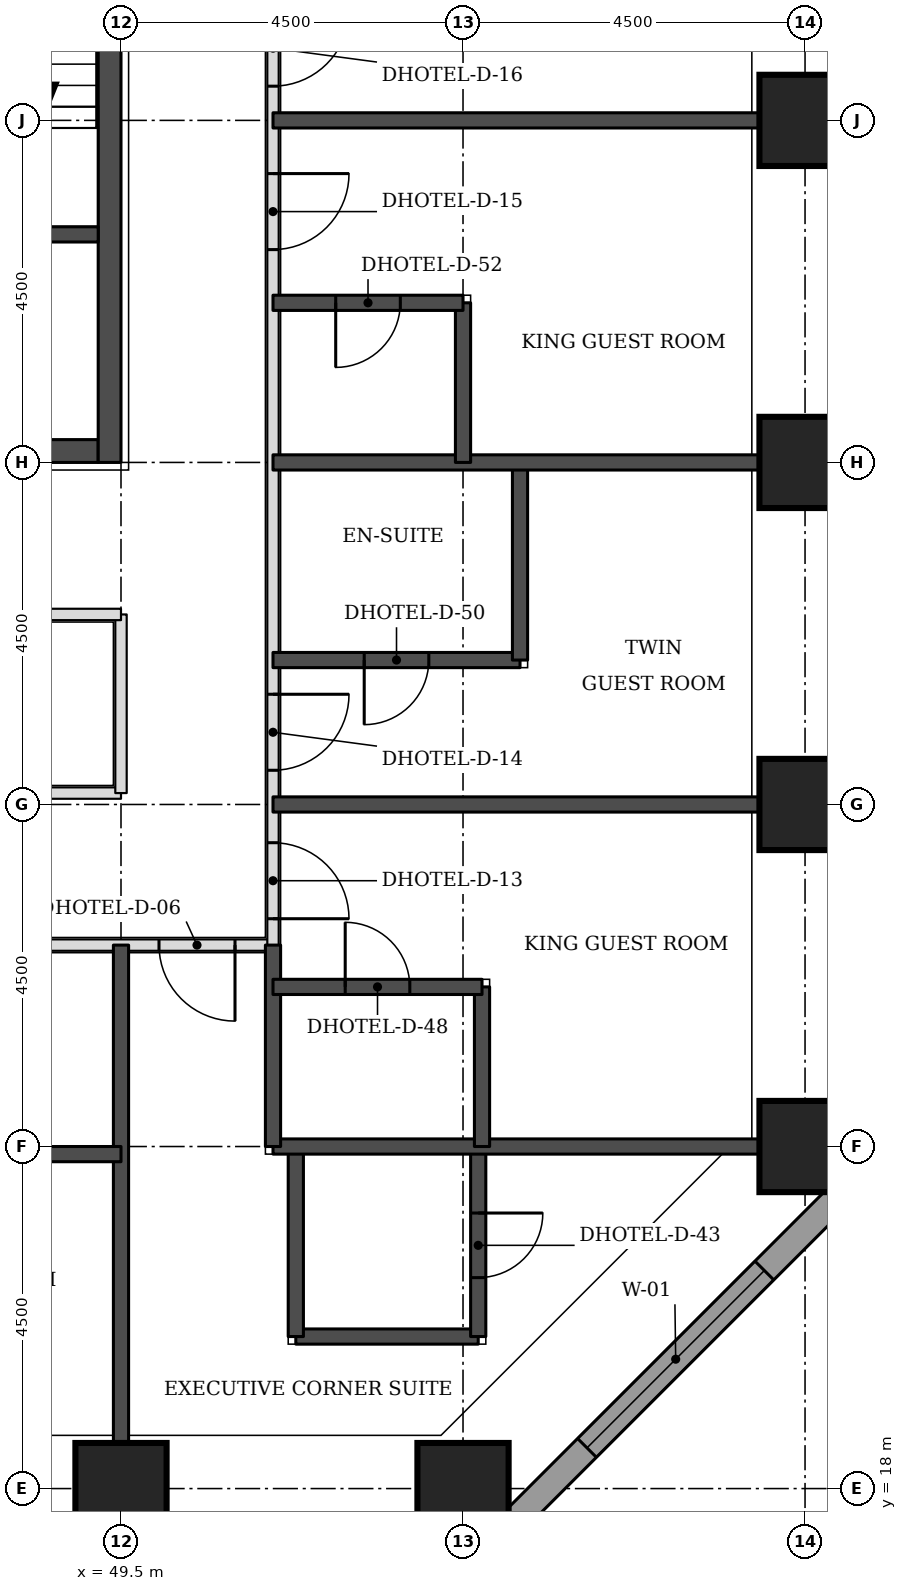
"""IFC4 building model, lengths in metres.
Left out: names, types, materials, properties, quantities, classifications, styles, units other than length and angle.
Written with IfcOpenShell. Run it as: python <this file> out.ifc"""

import sys

from ifc_helpers import new_model, si_unit, direction, frame, frame_2d, origin, origin_2d, place, context, subcontext, project, spatial, rectangle, extrude, element, fill, save


model = new_model("IFC4")
c1 = context("Model", 3, precision=1e-05, world=origin(), true_north=direction((0.0, 1.0)))
c2 = subcontext(c1, "Body", "Model", "MODEL_VIEW")
j1 = project(units=[si_unit("LENGTHUNIT", "METRE"), si_unit("PLANEANGLEUNIT", "RADIAN")], contexts=[c1])
p1 = place(None, origin())
s1 = spatial("IfcSite", under=j1, at=p1, CompositionType="ELEMENT")
p2 = place(p1, origin())
s2 = spatial("IfcBuilding", under=s1, at=p2, CompositionType="ELEMENT")
p3 = place(p2, frame((0.0, 0.0, 59.4)))
s3 = spatial("IfcBuildingStorey", under=s2, at=p3, CompositionType="ELEMENT", Elevation=59.4)
for number, where, z_axis, x_axis in (
    (1, (49.5, 18.0, 0.0), (0.0, 0.0, 1.0), (1.0, 0.0, 0.0)),
    (2, (54.0, 18.0, 0.0), (0.0, 0.0, 1.0), (1.0, 0.0, 0.0)),
    (3, (58.5, 22.5, 0.0), (0.0, 0.0, 1.0), (1.0, 0.0, 0.0)),
    (4, (58.5, 27.0, 0.0), (0.0, 0.0, 1.0), (1.0, 0.0, 0.0)),
    (5, (58.5, 31.5, 0.0), (0.0, 0.0, 1.0), (1.0, 0.0, 0.0)),
    (6, (58.5, 36.0, 0.0), (0.0, 0.0, 1.0), (1.0, 0.0, 0.0)),
):
    element("IfcColumn", number, at=place(p3, frame(where, z_axis=z_axis, x_axis=x_axis)), inside=s3, PredefinedType="COLUMN", context=c2, shape_type="SweptSolid", body=[
        extrude(rectangle(XDim=1.2, YDim=1.2, at=origin_2d()), origin(), (0.0, 0.0, 1.0), 3.3),
    ])
p4 = place(p3, frame((40.8, 31.65, 0.0), z_axis=(0.0, 0.0, 1.0), x_axis=(1.0, 0.0, 0.0)))
e7 = element("IfcWall", 7, at=p4, inside=s3, PredefinedType="SHEAR", context=c2, shape_type="SweptSolid", body=[
    extrude(rectangle(XDim=8.4, YDim=0.3, at=frame_2d((4.2, 0.0))), origin(), (0.0, 0.0, 1.0), 3.3),
])
p5 = place(p4, frame((5.2, 0.0, 0.0)))
e8 = element("IfcOpeningElement", 8, at=p5, cuts=e7, PredefinedType="OPENING", context=c2, shape_type="SweptSolid", body=[
    extrude(rectangle(XDim=1.0, YDim=2.1, at=frame_2d((0.5, 1.05))), frame((0.0, 0.16, 0.0), z_axis=(0.0, -1.0, 0.0), x_axis=(1.0, 0.0, 0.0)), (0.0, 0.0, 1.0), 0.32),
])
p6 = place(p3, frame((49.35, 31.5, 0.0), z_axis=(0.0, 0.0, 1.0), x_axis=(0.0, 1.0, 0.0)))
e9 = element("IfcWall", 9, at=p6, inside=s3, PredefinedType="SHEAR", context=c2, shape_type="SweptSolid", body=[
    extrude(rectangle(XDim=9.0, YDim=0.3, at=frame_2d((4.5, 0.0))), origin(), (0.0, 0.0, 1.0), 3.3),
])
p7 = place(p3, frame((54.27, 17.174, 0.0), z_axis=(0.0, 0.0, 1.0), x_axis=(0.707106781187, 0.707106781187, 0.0)))
e10 = element("IfcWall", 10, at=p7, inside=s3, PredefinedType="STANDARD", context=c2, shape_type="SweptSolid", body=[
    extrude(rectangle(XDim=7.151, YDim=0.35, at=frame_2d((3.576, 0.0))), origin(), (0.0, 0.0, 1.0), 3.055),
])
p8 = place(p7, frame((1.926, 0.0, 0.8)))
e11 = element("IfcOpeningElement", 11, at=p8, cuts=e10, PredefinedType="OPENING", context=c2, shape_type="SweptSolid", body=[
    extrude(rectangle(XDim=3.3, YDim=1.5, at=frame_2d((1.65, 0.75))), frame((0.0, 0.185, 0.0), z_axis=(0.0, -1.0, 0.0), x_axis=(1.0, 0.0, 0.0)), (0.0, 0.0, 1.0), 0.37),
])
p9 = place(p3, frame((19.15, 25.15, 0.0), z_axis=(0.0, 0.0, 1.0), x_axis=(1.0, 0.0, 0.0)))
e12 = element("IfcWall", 12, at=p9, inside=s3, PredefinedType="PARTITIONING", context=c2, shape_type="SweptSolid", body=[
    extrude(rectangle(XDim=32.35, YDim=0.15, at=frame_2d((16.175, 0.0))), origin(), (0.0, 0.0, 1.0), 3.08),
])
p10 = place(p9, frame((6.4, 0.0, 0.0)))
e13 = element("IfcOpeningElement", 13, at=p10, cuts=e12, PredefinedType="OPENING", context=c2, shape_type="SweptSolid", body=[
    extrude(rectangle(XDim=1.0, YDim=2.1, at=frame_2d((0.5, 1.05))), frame((0.0, 0.085, 0.0), z_axis=(0.0, -1.0, 0.0), x_axis=(1.0, 0.0, 0.0)), (0.0, 0.0, 1.0), 0.17),
])
p11 = place(p9, frame((10.5, 0.0, 0.0)))
e14 = element("IfcOpeningElement", 14, at=p11, cuts=e12, PredefinedType="OPENING", context=c2, shape_type="SweptSolid", body=[
    extrude(rectangle(XDim=1.0, YDim=2.1, at=frame_2d((0.5, 1.05))), frame((0.0, 0.085, 0.0), z_axis=(0.0, -1.0, 0.0), x_axis=(1.0, 0.0, 0.0)), (0.0, 0.0, 1.0), 0.17),
])
p12 = place(p9, frame((22.45, 0.0, 0.0)))
e15 = element("IfcOpeningElement", 15, at=p12, cuts=e12, PredefinedType="OPENING", context=c2, shape_type="SweptSolid", body=[
    extrude(rectangle(XDim=1.0, YDim=2.1, at=frame_2d((0.5, 1.05))), frame((0.0, 0.085, 0.0), z_axis=(0.0, -1.0, 0.0), x_axis=(1.0, 0.0, 0.0)), (0.0, 0.0, 1.0), 0.17),
])
p13 = place(p9, frame((26.55, 0.0, 0.0)))
e16 = element("IfcOpeningElement", 16, at=p13, cuts=e12, PredefinedType="OPENING", context=c2, shape_type="SweptSolid", body=[
    extrude(rectangle(XDim=1.0, YDim=2.1, at=frame_2d((0.5, 1.05))), frame((0.0, 0.085, 0.0), z_axis=(0.0, -1.0, 0.0), x_axis=(1.0, 0.0, 0.0)), (0.0, 0.0, 1.0), 0.17),
])
p14 = place(p9, frame((1.175, 0.0, 0.0)))
e17 = element("IfcOpeningElement", 17, at=p14, cuts=e12, PredefinedType="OPENING", context=c2, shape_type="SweptSolid", body=[
    extrude(rectangle(XDim=1.0, YDim=2.1, at=frame_2d((0.5, 1.05))), frame((0.0, 0.085, 0.0), z_axis=(0.0, -1.0, 0.0), x_axis=(1.0, 0.0, 0.0)), (0.0, 0.0, 1.0), 0.17),
])
p15 = place(p9, frame((30.85, 0.0, 0.0)))
e18 = element("IfcOpeningElement", 18, at=p15, cuts=e12, PredefinedType="OPENING", context=c2, shape_type="SweptSolid", body=[
    extrude(rectangle(XDim=1.0, YDim=2.1, at=frame_2d((0.5, 1.05))), frame((0.0, 0.085, 0.0), z_axis=(0.0, -1.0, 0.0), x_axis=(1.0, 0.0, 0.0)), (0.0, 0.0, 1.0), 0.17),
])
p16 = place(p3, frame((51.5, 25.15, 0.0), z_axis=(0.0, 0.0, 1.0), x_axis=(0.0, 1.0, 0.0)))
e19 = element("IfcWall", 19, at=p16, inside=s3, PredefinedType="PARTITIONING", context=c2, shape_type="SweptSolid", body=[
    extrude(rectangle(XDim=22.35, YDim=0.15, at=frame_2d((11.175, 0.0))), origin(), (0.0, 0.0, 1.0), 3.08),
])
p17 = place(p16, frame((0.347, 0.0, 0.0)))
e20 = element("IfcOpeningElement", 20, at=p17, cuts=e19, PredefinedType="OPENING", context=c2, shape_type="SweptSolid", body=[
    extrude(rectangle(XDim=1.0, YDim=2.1, at=frame_2d((0.5, 1.05))), frame((0.0, 0.085, 0.0), z_axis=(0.0, -1.0, 0.0), x_axis=(1.0, 0.0, 0.0)), (0.0, 0.0, 1.0), 0.17),
])
p18 = place(p16, frame((2.3, 0.0, 0.0)))
e21 = element("IfcOpeningElement", 21, at=p18, cuts=e19, PredefinedType="OPENING", context=c2, shape_type="SweptSolid", body=[
    extrude(rectangle(XDim=1.0, YDim=2.1, at=frame_2d((0.5, 1.05))), frame((0.0, 0.085, 0.0), z_axis=(0.0, -1.0, 0.0), x_axis=(1.0, 0.0, 0.0)), (0.0, 0.0, 1.0), 0.17),
])
p19 = place(p16, frame((9.15, 0.0, 0.0)))
e22 = element("IfcOpeningElement", 22, at=p19, cuts=e19, PredefinedType="OPENING", context=c2, shape_type="SweptSolid", body=[
    extrude(rectangle(XDim=1.0, YDim=2.1, at=frame_2d((0.5, 1.05))), frame((0.0, 0.085, 0.0), z_axis=(0.0, -1.0, 0.0), x_axis=(1.0, 0.0, 0.0)), (0.0, 0.0, 1.0), 0.17),
])
p20 = place(p16, frame((11.3, 0.0, 0.0)))
e23 = element("IfcOpeningElement", 23, at=p20, cuts=e19, PredefinedType="OPENING", context=c2, shape_type="SweptSolid", body=[
    extrude(rectangle(XDim=1.0, YDim=2.1, at=frame_2d((0.5, 1.05))), frame((0.0, 0.085, 0.0), z_axis=(0.0, -1.0, 0.0), x_axis=(1.0, 0.0, 0.0)), (0.0, 0.0, 1.0), 0.17),
])
p21 = place(p16, frame((18.4, 0.0, 0.0)))
e24 = element("IfcOpeningElement", 24, at=p21, cuts=e19, PredefinedType="OPENING", context=c2, shape_type="SweptSolid", body=[
    extrude(rectangle(XDim=0.9, YDim=2.1, at=frame_2d((0.45, 1.05))), frame((0.0, 0.085, 0.0), z_axis=(0.0, -1.0, 0.0), x_axis=(1.0, 0.0, 0.0)), (0.0, 0.0, 1.0), 0.17),
])
p22 = place(p3, frame((40.5, 27.15, 0.0), z_axis=(0.0, 0.0, 1.0), x_axis=(1.0, 0.0, 0.0)))
e25 = element("IfcWall", 25, at=p22, inside=s3, PredefinedType="PARTITIONING", context=c2, shape_type="SweptSolid", body=[
    extrude(rectangle(XDim=9.0, YDim=0.15, at=frame_2d((4.5, 0.0))), origin(), (0.0, 0.0, 1.0), 3.08),
])
p23 = place(p3, frame((49.5, 27.15, 0.0), z_axis=(0.0, 0.0, 1.0), x_axis=(0.0, 1.0, 0.0)))
e26 = element("IfcWall", 26, at=p23, inside=s3, PredefinedType="PARTITIONING", context=c2, shape_type="SweptSolid", body=[
    extrude(rectangle(XDim=2.35, YDim=0.15, at=frame_2d((1.175, 0.0))), origin(), (0.0, 0.0, 1.0), 3.08),
])
p24 = place(p3, frame((40.5, 29.5, 0.0), z_axis=(0.0, 0.0, 1.0), x_axis=(1.0, 0.0, 0.0)))
e27 = element("IfcWall", 27, at=p24, inside=s3, PredefinedType="PARTITIONING", context=c2, shape_type="SweptSolid", body=[
    extrude(rectangle(XDim=9.0, YDim=0.15, at=frame_2d((4.5, 0.0))), origin(), (0.0, 0.0, 1.0), 3.08),
])
p25 = place(p24, frame((4.05, 0.0, 0.0)))
e28 = element("IfcOpeningElement", 28, at=p25, cuts=e27, PredefinedType="OPENING", context=c2, shape_type="SweptSolid", body=[
    extrude(rectangle(XDim=0.9, YDim=2.1, at=frame_2d((0.45, 1.05))), frame((0.0, 0.085, 0.0), z_axis=(0.0, -1.0, 0.0), x_axis=(1.0, 0.0, 0.0)), (0.0, 0.0, 1.0), 0.17),
])
p26 = place(p3, frame((49.5, 18.6, 0.0), z_axis=(0.0, 0.0, 1.0), x_axis=(0.0, 1.0, 0.0)))
e29 = element("IfcWall", 29, at=p26, inside=s3, PredefinedType="SOLIDWALL", context=c2, shape_type="SweptSolid", body=[
    extrude(rectangle(XDim=6.55, YDim=0.2, at=frame_2d((3.275, 0.0))), origin(), (0.0, 0.0, 1.0), 3.08),
])
p27 = place(p3, frame((51.8, 20.0, 0.0), z_axis=(0.0, 0.0, 1.0), x_axis=(1.0, 0.0, 0.0)))
e30 = element("IfcWall", 30, at=p27, inside=s3, PredefinedType="SOLIDWALL", context=c2, shape_type="SweptSolid", body=[
    extrude(rectangle(XDim=2.4, YDim=0.2, at=frame_2d((1.2, 0.0))), origin(), (0.0, 0.0, 1.0), 3.08),
])
p28 = place(p3, frame((51.8, 20.0, 0.0), z_axis=(0.0, 0.0, 1.0), x_axis=(0.0, 1.0, 0.0)))
e31 = element("IfcWall", 31, at=p28, inside=s3, PredefinedType="SOLIDWALL", context=c2, shape_type="SweptSolid", body=[
    extrude(rectangle(XDim=2.5, YDim=0.2, at=frame_2d((1.25, 0.0))), origin(), (0.0, 0.0, 1.0), 3.08),
])
p29 = place(p3, frame((54.2, 20.0, 0.0), z_axis=(0.0, 0.0, 1.0), x_axis=(0.0, 1.0, 0.0)))
e32 = element("IfcWall", 32, at=p29, inside=s3, PredefinedType="SOLIDWALL", context=c2, shape_type="SweptSolid", body=[
    extrude(rectangle(XDim=2.5, YDim=0.2, at=frame_2d((1.25, 0.0))), origin(), (0.0, 0.0, 1.0), 3.08),
])
p30 = place(p29, frame((0.775, 0.0, 0.0)))
e33 = element("IfcOpeningElement", 33, at=p30, cuts=e32, PredefinedType="OPENING", context=c2, shape_type="SweptSolid", body=[
    extrude(rectangle(XDim=0.85, YDim=2.1, at=frame_2d((0.425, 1.05))), frame((0.0, 0.11, 0.0), z_axis=(0.0, -1.0, 0.0), x_axis=(1.0, 0.0, 0.0)), (0.0, 0.0, 1.0), 0.22),
])
p31 = place(p3, frame((47.4, 22.4, 0.0), z_axis=(0.0, 0.0, 1.0), x_axis=(1.0, 0.0, 0.0)))
e34 = element("IfcWall", 34, at=p31, inside=s3, PredefinedType="SOLIDWALL", context=c2, shape_type="SweptSolid", body=[
    extrude(rectangle(XDim=2.1, YDim=0.2, at=frame_2d((1.05, 0.0))), origin(), (0.0, 0.0, 1.0), 3.08),
])
p32 = place(p3, frame((51.5, 22.5, 0.0), z_axis=(0.0, 0.0, 1.0), x_axis=(1.0, 0.0, 0.0)))
e35 = element("IfcWall", 35, at=p32, inside=s3, PredefinedType="SOLIDWALL", context=c2, shape_type="SweptSolid", body=[
    extrude(rectangle(XDim=6.4, YDim=0.2, at=frame_2d((3.2, 0.0))), origin(), (0.0, 0.0, 1.0), 3.08),
])
p33 = place(p3, frame((51.5, 22.5, 0.0), z_axis=(0.0, 0.0, 1.0), x_axis=(0.0, 1.0, 0.0)))
e36 = element("IfcWall", 36, at=p33, inside=s3, PredefinedType="SOLIDWALL", context=c2, shape_type="SweptSolid", body=[
    extrude(rectangle(XDim=2.65, YDim=0.2, at=frame_2d((1.325, 0.0))), origin(), (0.0, 0.0, 1.0), 3.08),
])
p34 = place(p3, frame((54.25, 22.5, 0.0), z_axis=(0.0, 0.0, 1.0), x_axis=(0.0, 1.0, 0.0)))
e37 = element("IfcWall", 37, at=p34, inside=s3, PredefinedType="SOLIDWALL", context=c2, shape_type="SweptSolid", body=[
    extrude(rectangle(XDim=2.1, YDim=0.2, at=frame_2d((1.05, 0.0))), origin(), (0.0, 0.0, 1.0), 3.08),
])
p35 = place(p3, frame((51.5, 24.6, 0.0), z_axis=(0.0, 0.0, 1.0), x_axis=(1.0, 0.0, 0.0)))
e38 = element("IfcWall", 38, at=p35, inside=s3, PredefinedType="SOLIDWALL", context=c2, shape_type="SweptSolid", body=[
    extrude(rectangle(XDim=2.75, YDim=0.2, at=frame_2d((1.375, 0.0))), origin(), (0.0, 0.0, 1.0), 3.08),
])
p36 = place(p35, frame((0.95, 0.0, 0.0)))
e39 = element("IfcOpeningElement", 39, at=p36, cuts=e38, PredefinedType="OPENING", context=c2, shape_type="SweptSolid", body=[
    extrude(rectangle(XDim=0.85, YDim=2.1, at=frame_2d((0.425, 1.05))), frame((0.0, 0.11, 0.0), z_axis=(0.0, -1.0, 0.0), x_axis=(1.0, 0.0, 0.0)), (0.0, 0.0, 1.0), 0.22),
])
p37 = place(p3, frame((51.5, 27.0, 0.0), z_axis=(0.0, 0.0, 1.0), x_axis=(1.0, 0.0, 0.0)))
e40 = element("IfcWall", 40, at=p37, inside=s3, PredefinedType="SOLIDWALL", context=c2, shape_type="SweptSolid", body=[
    extrude(rectangle(XDim=6.4, YDim=0.2, at=frame_2d((3.2, 0.0))), origin(), (0.0, 0.0, 1.0), 3.08),
])
p38 = place(p3, frame((51.5, 28.9, 0.0), z_axis=(0.0, 0.0, 1.0), x_axis=(1.0, 0.0, 0.0)))
e41 = element("IfcWall", 41, at=p38, inside=s3, PredefinedType="SOLIDWALL", context=c2, shape_type="SweptSolid", body=[
    extrude(rectangle(XDim=3.25, YDim=0.2, at=frame_2d((1.625, 0.0))), origin(), (0.0, 0.0, 1.0), 3.08),
])
p39 = place(p38, frame((1.2, 0.0, 0.0)))
e42 = element("IfcOpeningElement", 42, at=p39, cuts=e41, PredefinedType="OPENING", context=c2, shape_type="SweptSolid", body=[
    extrude(rectangle(XDim=0.85, YDim=2.1, at=frame_2d((0.425, 1.05))), frame((0.0, 0.11, 0.0), z_axis=(0.0, -1.0, 0.0), x_axis=(1.0, 0.0, 0.0)), (0.0, 0.0, 1.0), 0.22),
])
p40 = place(p3, frame((54.75, 28.9, 0.0), z_axis=(0.0, 0.0, 1.0), x_axis=(0.0, 1.0, 0.0)))
e43 = element("IfcWall", 43, at=p40, inside=s3, PredefinedType="SOLIDWALL", context=c2, shape_type="SweptSolid", body=[
    extrude(rectangle(XDim=2.6, YDim=0.2, at=frame_2d((1.3, 0.0))), origin(), (0.0, 0.0, 1.0), 3.08),
])
p41 = place(p3, frame((51.5, 31.5, 0.0), z_axis=(0.0, 0.0, 1.0), x_axis=(1.0, 0.0, 0.0)))
e44 = element("IfcWall", 44, at=p41, inside=s3, PredefinedType="SOLIDWALL", context=c2, shape_type="SweptSolid", body=[
    extrude(rectangle(XDim=6.4, YDim=0.2, at=frame_2d((3.2, 0.0))), origin(), (0.0, 0.0, 1.0), 3.08),
])
p42 = place(p3, frame((54.0, 31.5, 0.0), z_axis=(0.0, 0.0, 1.0), x_axis=(0.0, 1.0, 0.0)))
e45 = element("IfcWall", 45, at=p42, inside=s3, PredefinedType="SOLIDWALL", context=c2, shape_type="SweptSolid", body=[
    extrude(rectangle(XDim=2.1, YDim=0.2, at=frame_2d((1.05, 0.0))), origin(), (0.0, 0.0, 1.0), 3.08),
])
p43 = place(p3, frame((51.5, 33.6, 0.0), z_axis=(0.0, 0.0, 1.0), x_axis=(1.0, 0.0, 0.0)))
e46 = element("IfcWall", 46, at=p43, inside=s3, PredefinedType="SOLIDWALL", context=c2, shape_type="SweptSolid", body=[
    extrude(rectangle(XDim=2.5, YDim=0.2, at=frame_2d((1.25, 0.0))), origin(), (0.0, 0.0, 1.0), 3.08),
])
p44 = place(p43, frame((0.825, 0.0, 0.0)))
e47 = element("IfcOpeningElement", 47, at=p44, cuts=e46, PredefinedType="OPENING", context=c2, shape_type="SweptSolid", body=[
    extrude(rectangle(XDim=0.85, YDim=2.1, at=frame_2d((0.425, 1.05))), frame((0.0, 0.11, 0.0), z_axis=(0.0, -1.0, 0.0), x_axis=(1.0, 0.0, 0.0)), (0.0, 0.0, 1.0), 0.22),
])
p45 = place(p3, frame((51.5, 36.0, 0.0), z_axis=(0.0, 0.0, 1.0), x_axis=(1.0, 0.0, 0.0)))
e48 = element("IfcWall", 48, at=p45, inside=s3, PredefinedType="SOLIDWALL", context=c2, shape_type="SweptSolid", body=[
    extrude(rectangle(XDim=6.4, YDim=0.2, at=frame_2d((3.2, 0.0))), origin(), (0.0, 0.0, 1.0), 3.08),
])
p46 = place(p3, frame((46.2, 34.5, 0.0), z_axis=(0.0, 0.0, 1.0), x_axis=(1.0, 0.0, 0.0)))
e49 = element("IfcWall", 49, at=p46, inside=s3, PredefinedType="SOLIDWALL", context=c2, shape_type="SweptSolid", body=[
    extrude(rectangle(XDim=3.0, YDim=0.2, at=frame_2d((1.5, 0.0))), origin(), (0.0, 0.0, 1.0), 3.08),
])
p47 = place(p8, origin())
e50 = element("IfcWindow", 50, at=p47, inside=s3, PartitioningType="SINGLE_PANEL", PredefinedType="WINDOW", context=c2, shape_type="SweptSolid", body=[
    extrude(rectangle(XDim=3.3, YDim=1.5, at=frame_2d((1.65, 0.75))), frame((0.0, 0.085, 0.0), z_axis=(0.0, -1.0, 0.0), x_axis=(1.0, 0.0, 0.0)), (0.0, 0.0, 1.0), 0.06),
])
fill(e11, e50)
p48 = place(p17, frame((1.0, 0.0, 0.0), z_axis=(0.0, 0.0, 1.0), x_axis=(-1.0, 0.0, 0.0)))
e51 = element("IfcDoor", 51, at=p48, inside=s3, OperationType="SINGLE_SWING_RIGHT", PredefinedType="DOOR", context=c2, shape_type="SweptSolid", body=[
    extrude(rectangle(XDim=1.0, YDim=2.1, at=frame_2d((0.5, 1.05))), frame((0.0, 0.025, 0.0), z_axis=(0.0, -1.0, 0.0), x_axis=(1.0, 0.0, 0.0)), (0.0, 0.0, 1.0), 0.05),
])
fill(e20, e51)
p49 = place(p36, origin())
e52 = element("IfcDoor", 52, at=p49, inside=s3, OperationType="SINGLE_SWING_LEFT", PredefinedType="DOOR", context=c2, shape_type="SweptSolid", body=[
    extrude(rectangle(XDim=0.85, YDim=2.1, at=frame_2d((0.425, 1.05))), frame((0.0, 0.025, 0.0), z_axis=(0.0, -1.0, 0.0), x_axis=(1.0, 0.0, 0.0)), (0.0, 0.0, 1.0), 0.05),
])
fill(e39, e52)
p50 = place(p18, frame((1.0, 0.0, 0.0), z_axis=(0.0, 0.0, 1.0), x_axis=(-1.0, 0.0, 0.0)))
e53 = element("IfcDoor", 53, at=p50, inside=s3, OperationType="SINGLE_SWING_LEFT", PredefinedType="DOOR", context=c2, shape_type="SweptSolid", body=[
    extrude(rectangle(XDim=1.0, YDim=2.1, at=frame_2d((0.5, 1.05))), frame((0.0, 0.025, 0.0), z_axis=(0.0, -1.0, 0.0), x_axis=(1.0, 0.0, 0.0)), (0.0, 0.0, 1.0), 0.05),
])
fill(e21, e53)
p51 = place(p39, frame((0.85, 0.0, 0.0), z_axis=(0.0, 0.0, 1.0), x_axis=(-1.0, 0.0, 0.0)))
e54 = element("IfcDoor", 54, at=p51, inside=s3, OperationType="SINGLE_SWING_RIGHT", PredefinedType="DOOR", context=c2, shape_type="SweptSolid", body=[
    extrude(rectangle(XDim=0.85, YDim=2.1, at=frame_2d((0.425, 1.05))), frame((0.0, 0.025, 0.0), z_axis=(0.0, -1.0, 0.0), x_axis=(1.0, 0.0, 0.0)), (0.0, 0.0, 1.0), 0.05),
])
fill(e42, e54)
p52 = place(p19, frame((1.0, 0.0, 0.0), z_axis=(0.0, 0.0, 1.0), x_axis=(-1.0, 0.0, 0.0)))
e55 = element("IfcDoor", 55, at=p52, inside=s3, OperationType="SINGLE_SWING_LEFT", PredefinedType="DOOR", context=c2, shape_type="SweptSolid", body=[
    extrude(rectangle(XDim=1.0, YDim=2.1, at=frame_2d((0.5, 1.05))), frame((0.0, 0.025, 0.0), z_axis=(0.0, -1.0, 0.0), x_axis=(1.0, 0.0, 0.0)), (0.0, 0.0, 1.0), 0.05),
])
fill(e22, e55)
p53 = place(p44, frame((0.85, 0.0, 0.0), z_axis=(0.0, 0.0, 1.0), x_axis=(-1.0, 0.0, 0.0)))
e56 = element("IfcDoor", 56, at=p53, inside=s3, OperationType="SINGLE_SWING_RIGHT", PredefinedType="DOOR", context=c2, shape_type="SweptSolid", body=[
    extrude(rectangle(XDim=0.85, YDim=2.1, at=frame_2d((0.425, 1.05))), frame((0.0, 0.025, 0.0), z_axis=(0.0, -1.0, 0.0), x_axis=(1.0, 0.0, 0.0)), (0.0, 0.0, 1.0), 0.05),
])
fill(e47, e56)
p54 = place(p20, frame((1.0, 0.0, 0.0), z_axis=(0.0, 0.0, 1.0), x_axis=(-1.0, 0.0, 0.0)))
e57 = element("IfcDoor", 57, at=p54, inside=s3, OperationType="SINGLE_SWING_LEFT", PredefinedType="DOOR", context=c2, shape_type="SweptSolid", body=[
    extrude(rectangle(XDim=1.0, YDim=2.1, at=frame_2d((0.5, 1.05))), frame((0.0, 0.025, 0.0), z_axis=(0.0, -1.0, 0.0), x_axis=(1.0, 0.0, 0.0)), (0.0, 0.0, 1.0), 0.05),
])
fill(e23, e57)
p55 = place(p15, frame((1.0, 0.0, 0.0), z_axis=(0.0, 0.0, 1.0), x_axis=(-1.0, 0.0, 0.0)))
e58 = element("IfcDoor", 58, at=p55, inside=s3, OperationType="SINGLE_SWING_LEFT", PredefinedType="DOOR", context=c2, shape_type="SweptSolid", body=[
    extrude(rectangle(XDim=1.0, YDim=2.1, at=frame_2d((0.5, 1.05))), frame((0.0, 0.025, 0.0), z_axis=(0.0, -1.0, 0.0), x_axis=(1.0, 0.0, 0.0)), (0.0, 0.0, 1.0), 0.05),
])
fill(e18, e58)
p56 = place(p30, frame((0.85, 0.0, 0.0), z_axis=(0.0, 0.0, 1.0), x_axis=(-1.0, 0.0, 0.0)))
e59 = element("IfcDoor", 59, at=p56, inside=s3, OperationType="SINGLE_SWING_LEFT", PredefinedType="DOOR", context=c2, shape_type="SweptSolid", body=[
    extrude(rectangle(XDim=0.85, YDim=2.1, at=frame_2d((0.425, 1.05))), frame((0.0, 0.025, 0.0), z_axis=(0.0, -1.0, 0.0), x_axis=(1.0, 0.0, 0.0)), (0.0, 0.0, 1.0), 0.05),
])
fill(e33, e59)
save(model, sys.argv[1])
